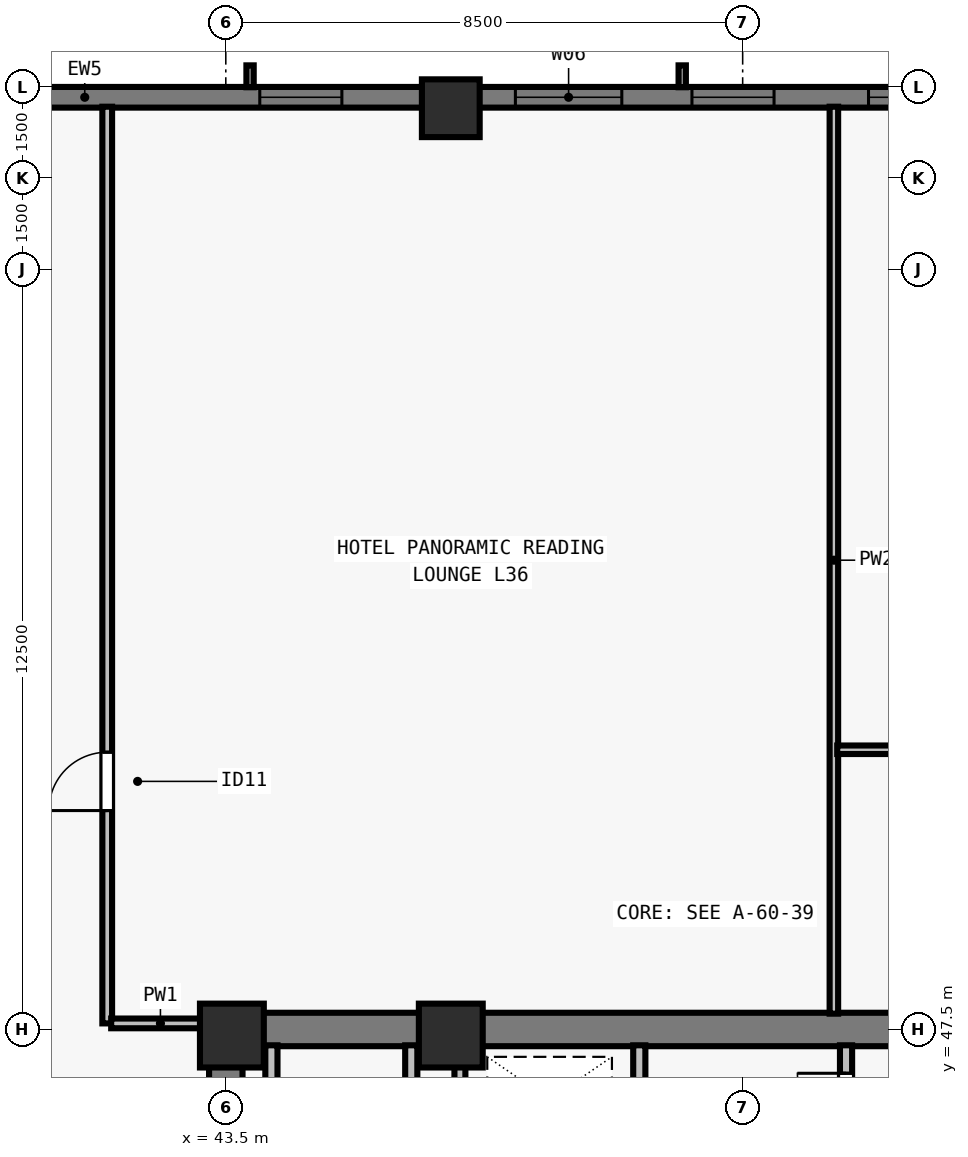
"""IFC4 building model, lengths in metres.
Left out: names, types, materials, properties, quantities, classifications, styles, units other than length and angle.
Written with IfcOpenShell. Run it as: python <this file> out.ifc"""

import sys

from ifc_helpers import new_model, si_unit, direction, frame, frame_2d, origin, origin_2d, place, context, subcontext, project, spatial, rectangle, extrude, element, fill, save


model = new_model("IFC4")
c1 = context("Model", 3, precision=1e-05, world=origin(), true_north=direction((0.0, 1.0)))
c2 = subcontext(c1, "Body", "Model", "MODEL_VIEW")
j1 = project(units=[si_unit("LENGTHUNIT", "METRE"), si_unit("PLANEANGLEUNIT", "RADIAN")], contexts=[c1])
p1 = place(None, origin())
s1 = spatial("IfcSite", under=j1, at=p1, CompositionType="ELEMENT")
p2 = place(p1, origin())
s2 = spatial("IfcBuilding", under=s1, at=p2, CompositionType="ELEMENT")
p3 = place(p2, frame((0.0, 0.0, 134.0)))
s3 = spatial("IfcBuildingStorey", under=s2, at=p3, CompositionType="ELEMENT", Elevation=134.0)
for number, where, z_axis, x_axis in (
    (1, (43.6, 47.4, 0.0), (0.0, 0.0, 1.0), (1.0, 0.0, 0.0)),
    (2, (47.2, 47.4, 0.0), (0.0, 0.0, 1.0), (1.0, 0.0, 0.0)),
):
    element("IfcColumn", number, at=place(p3, frame(where, z_axis=z_axis, x_axis=x_axis)), inside=s3, PredefinedType="COLUMN", context=c2, shape_type="SweptSolid", body=[
        extrude(rectangle(XDim=1.05, YDim=1.05, at=origin_2d()), origin(), (0.0, 0.0, 1.0), 3.5),
    ])
p4 = place(p3, frame((47.2, 62.65, 0.0), z_axis=(0.0, 0.0, 1.0), x_axis=(1.0, 0.0, 0.0)))
e3 = element("IfcColumn", 3, at=p4, inside=s3, PredefinedType="COLUMN", context=c2, shape_type="SweptSolid", body=[
    extrude(rectangle(XDim=0.95, YDim=0.95, at=origin_2d()), origin(), (0.0, 0.0, 1.0), 3.5),
])
p5 = place(p3, frame((32.0, 62.83, 0.0), z_axis=(0.0, 0.0, 1.0), x_axis=(1.0, 0.0, 0.0)))
e4 = element("IfcWall", 4, at=p5, inside=s3, PredefinedType="SOLIDWALL", context=c2, shape_type="SweptSolid", body=[
    extrude(rectangle(XDim=39.682, YDim=0.34, at=frame_2d((19.841, 0.0))), origin(), (0.0, 0.0, 1.0), 3.28),
])
p6 = place(p5, frame((4.952, 0.0, 0.8)))
e5 = element("IfcOpeningElement", 5, at=p6, cuts=e4, PredefinedType="OPENING", context=c2, shape_type="SweptSolid", body=[
    extrude(rectangle(XDim=1.35, YDim=1.66, at=frame_2d((0.675, 0.83))), frame((0.0, 0.18, 0.0), z_axis=(0.0, -1.0, 0.0), x_axis=(1.0, 0.0, 0.0)), (0.0, 0.0, 1.0), 0.36),
])
p7 = place(p5, frame((12.059, 0.0, 0.8)))
e6 = element("IfcOpeningElement", 6, at=p7, cuts=e4, PredefinedType="OPENING", context=c2, shape_type="SweptSolid", body=[
    extrude(rectangle(XDim=1.35, YDim=1.66, at=frame_2d((0.675, 0.83))), frame((0.0, 0.18, 0.0), z_axis=(0.0, -1.0, 0.0), x_axis=(1.0, 0.0, 0.0)), (0.0, 0.0, 1.0), 0.36),
])
p8 = place(p5, frame((16.262, 0.0, 0.8)))
e7 = element("IfcOpeningElement", 7, at=p8, cuts=e4, PredefinedType="OPENING", context=c2, shape_type="SweptSolid", body=[
    extrude(rectangle(XDim=1.75, YDim=1.66, at=frame_2d((0.875, 0.83))), frame((0.0, 0.18, 0.0), z_axis=(0.0, -1.0, 0.0), x_axis=(1.0, 0.0, 0.0)), (0.0, 0.0, 1.0), 0.36),
])
p9 = place(p5, frame((19.166, 0.0, 0.8)))
e8 = element("IfcOpeningElement", 8, at=p9, cuts=e4, PredefinedType="OPENING", context=c2, shape_type="SweptSolid", body=[
    extrude(rectangle(XDim=1.35, YDim=1.66, at=frame_2d((0.675, 0.83))), frame((0.0, 0.18, 0.0), z_axis=(0.0, -1.0, 0.0), x_axis=(1.0, 0.0, 0.0)), (0.0, 0.0, 1.0), 0.36),
])
p10 = place(p5, frame((22.07, 0.0, 0.8)))
e9 = element("IfcOpeningElement", 9, at=p10, cuts=e4, PredefinedType="OPENING", context=c2, shape_type="SweptSolid", body=[
    extrude(rectangle(XDim=1.75, YDim=1.66, at=frame_2d((0.875, 0.83))), frame((0.0, 0.18, 0.0), z_axis=(0.0, -1.0, 0.0), x_axis=(1.0, 0.0, 0.0)), (0.0, 0.0, 1.0), 0.36),
])
p11 = place(p5, frame((26.273, 0.0, 0.8)))
e10 = element("IfcOpeningElement", 10, at=p11, cuts=e4, PredefinedType="OPENING", context=c2, shape_type="SweptSolid", body=[
    extrude(rectangle(XDim=1.35, YDim=1.66, at=frame_2d((0.675, 0.83))), frame((0.0, 0.18, 0.0), z_axis=(0.0, -1.0, 0.0), x_axis=(1.0, 0.0, 0.0)), (0.0, 0.0, 1.0), 0.36),
])
p12 = place(p5, frame((29.627, 0.0, 0.8)))
e11 = element("IfcOpeningElement", 11, at=p12, cuts=e4, PredefinedType="OPENING", context=c2, shape_type="SweptSolid", body=[
    extrude(rectangle(XDim=1.75, YDim=1.66, at=frame_2d((0.875, 0.83))), frame((0.0, 0.18, 0.0), z_axis=(0.0, -1.0, 0.0), x_axis=(1.0, 0.0, 0.0)), (0.0, 0.0, 1.0), 0.36),
])
p13 = place(p5, frame((34.23, 0.0, 0.8)))
e12 = element("IfcOpeningElement", 12, at=p13, cuts=e4, PredefinedType="OPENING", context=c2, shape_type="SweptSolid", body=[
    extrude(rectangle(XDim=1.35, YDim=1.66, at=frame_2d((0.675, 0.83))), frame((0.0, 0.18, 0.0), z_axis=(0.0, -1.0, 0.0), x_axis=(1.0, 0.0, 0.0)), (0.0, 0.0, 1.0), 0.36),
])
p14 = place(p3, frame((43.225, 47.5, 0.0), z_axis=(0.0, 0.0, 1.0), x_axis=(1.0, 0.0, 0.0)))
e13 = element("IfcWall", 13, at=p14, inside=s3, PredefinedType="SHEAR", context=c2, shape_type="SweptSolid", body=[
    extrude(rectangle(XDim=17.55, YDim=0.55, at=frame_2d((8.775, 0.0))), origin(), (0.0, 0.0, 1.0), 3.28),
])
p15 = place(p3, frame((43.5, 40.8, 0.0), z_axis=(0.0, 0.0, 1.0), x_axis=(0.0, 1.0, 0.0)))
e14 = element("IfcWall", 14, at=p15, inside=s3, PredefinedType="SHEAR", context=c2, shape_type="SweptSolid", body=[
    extrude(rectangle(XDim=6.435, YDim=0.55, at=frame_2d((3.218, 0.0))), origin(), (0.0, 0.0, 1.0), 3.28),
])
p16 = place(p3, frame((50.3, 40.585, 0.0), z_axis=(0.0, 0.0, 1.0), x_axis=(0.0, 1.0, 0.0)))
e15 = element("IfcWall", 15, at=p16, inside=s3, PredefinedType="SOLIDWALL", context=c2, shape_type="SweptSolid", body=[
    extrude(rectangle(XDim=6.655, YDim=0.2, at=frame_2d((3.328, 0.0))), origin(), (0.0, 0.0, 1.0), 3.28),
])
p17 = place(p16, frame((5.065, 0.0, 0.0)))
e16 = element("IfcOpeningElement", 16, at=p17, cuts=e15, PredefinedType="OPENING", context=c2, shape_type="SweptSolid", body=[
    extrude(rectangle(XDim=0.8, YDim=2.08, at=frame_2d((0.4, 1.04))), frame((0.0, 0.11, 0.0), z_axis=(0.0, -1.0, 0.0), x_axis=(1.0, 0.0, 0.0)), (0.0, 0.0, 1.0), 0.22),
])
p18 = place(p3, frame((53.7, 40.585, 0.0), z_axis=(0.0, 0.0, 1.0), x_axis=(0.0, 1.0, 0.0)))
e17 = element("IfcWall", 17, at=p18, inside=s3, PredefinedType="SOLIDWALL", context=c2, shape_type="SweptSolid", body=[
    extrude(rectangle(XDim=6.655, YDim=0.2, at=frame_2d((3.328, 0.0))), origin(), (0.0, 0.0, 1.0), 3.28),
])
p19 = place(p18, frame((0.195, 0.0, 0.0)))
e18 = element("IfcOpeningElement", 18, at=p19, cuts=e17, PredefinedType="OPENING", context=c2, shape_type="SweptSolid", body=[
    extrude(rectangle(XDim=0.8, YDim=2.08, at=frame_2d((0.4, 1.04))), frame((0.0, 0.11, 0.0), z_axis=(0.0, -1.0, 0.0), x_axis=(1.0, 0.0, 0.0)), (0.0, 0.0, 1.0), 0.22),
])
p20 = place(p18, frame((3.735, 0.0, 0.0)))
e19 = element("IfcOpeningElement", 19, at=p20, cuts=e17, PredefinedType="OPENING", context=c2, shape_type="SweptSolid", body=[
    extrude(rectangle(XDim=0.9, YDim=2.12, at=frame_2d((0.45, 1.06))), frame((0.0, 0.11, 0.0), z_axis=(0.0, -1.0, 0.0), x_axis=(1.0, 0.0, 0.0)), (0.0, 0.0, 1.0), 0.22),
])
p21 = place(p18, frame((5.395, 0.0, 0.0)))
e20 = element("IfcOpeningElement", 20, at=p21, cuts=e17, PredefinedType="OPENING", context=c2, shape_type="SweptSolid", body=[
    extrude(rectangle(XDim=0.8, YDim=2.1, at=frame_2d((0.4, 1.05))), frame((0.0, 0.11, 0.0), z_axis=(0.0, -1.0, 0.0), x_axis=(1.0, 0.0, 0.0)), (0.0, 0.0, 1.0), 0.22),
])
for number, where, z_axis, x_axis in (
    (21, (46.55, 43.735, 0.0), (0.0, 0.0, 1.0), (0.0, 1.0, 0.0)),
    (22, (44.25, 43.735, 0.0), (0.0, 0.0, 1.0), (0.0, 1.0, 0.0)),
):
    element("IfcWall", number, at=place(p3, frame(where, z_axis=z_axis, x_axis=x_axis)), inside=s3, PredefinedType="SOLIDWALL", context=c2, shape_type="SweptSolid", body=[
        extrude(rectangle(XDim=3.505, YDim=0.2, at=frame_2d((1.752, 0.0))), origin(), (0.0, 0.0, 1.0), 3.28),
    ])
p22 = place(p3, frame((47.35, 43.735, 0.0), z_axis=(0.0, 0.0, 1.0), x_axis=(0.0, 1.0, 0.0)))
e23 = element("IfcWall", 23, at=p22, inside=s3, PredefinedType="SOLIDWALL", context=c2, shape_type="SweptSolid", body=[
    extrude(rectangle(XDim=3.505, YDim=0.18, at=frame_2d((1.752, 0.0))), origin(), (0.0, 0.0, 1.0), 3.28),
])
p23 = place(p3, frame((41.55, 47.6, 0.0), z_axis=(0.0, 0.0, 1.0), x_axis=(0.0, 1.0, 0.0)))
e24 = element("IfcWall", 24, at=p23, inside=s3, PredefinedType="PARTITIONING", context=c2, shape_type="SweptSolid", body=[
    extrude(rectangle(XDim=15.075, YDim=0.16, at=frame_2d((7.538, 0.0))), origin(), (0.0, 0.0, 1.0), 2.555),
])
p24 = place(p23, frame((3.5, 0.0, 0.0)))
e25 = element("IfcOpeningElement", 25, at=p24, cuts=e24, PredefinedType="OPENING", context=c2, shape_type="SweptSolid", body=[
    extrude(rectangle(XDim=0.96, YDim=2.12, at=frame_2d((0.48, 1.06))), frame((0.0, 0.09, 0.0), z_axis=(0.0, -1.0, 0.0), x_axis=(1.0, 0.0, 0.0)), (0.0, 0.0, 1.0), 0.18),
])
p25 = place(p3, frame((41.615, 47.6, 0.0), z_axis=(0.0, 0.0, 1.0), x_axis=(1.0, 0.0, 0.0)))
e26 = element("IfcWall", 26, at=p25, inside=s3, PredefinedType="PARTITIONING", context=c2, shape_type="SweptSolid", body=[
    extrude(rectangle(XDim=1.62, YDim=0.16, at=frame_2d((0.81, 0.0))), origin(), (0.0, 0.0, 1.0), 3.28),
])
p26 = place(p3, frame((53.5, 47.76, 0.0), z_axis=(0.0, 0.0, 1.0), x_axis=(0.0, 1.0, 0.0)))
e27 = element("IfcWall", 27, at=p26, inside=s3, PredefinedType="PARTITIONING", context=c2, shape_type="SweptSolid", body=[
    extrude(rectangle(XDim=14.915, YDim=0.14, at=frame_2d((7.458, 0.0))), origin(), (0.0, 0.0, 1.0), 2.896),
])
p27 = place(p3, frame((53.555, 52.1, 0.0), z_axis=(0.0, 0.0, 1.0), x_axis=(1.0, 0.0, 0.0)))
e28 = element("IfcWall", 28, at=p27, inside=s3, PredefinedType="PARTITIONING", context=c2, shape_type="SweptSolid", body=[
    extrude(rectangle(XDim=10.13, YDim=0.14, at=frame_2d((5.065, 0.0))), origin(), (0.0, 0.0, 1.0), 3.28),
])
p28 = place(p7, origin())
e29 = element("IfcWindow", 29, at=p28, inside=s3, PartitioningType="SINGLE_PANEL", PredefinedType="WINDOW", context=c2, shape_type="SweptSolid", body=[
    extrude(rectangle(XDim=1.35, YDim=1.66, at=frame_2d((0.675, 0.83))), frame((0.0, -0.05, 0.0), z_axis=(0.0, -1.0, 0.0), x_axis=(1.0, 0.0, 0.0)), (0.0, 0.0, 1.0), 0.06),
])
fill(e6, e29)
p29 = place(p8, origin())
e30 = element("IfcWindow", 30, at=p29, inside=s3, PartitioningType="SINGLE_PANEL", PredefinedType="WINDOW", context=c2, shape_type="SweptSolid", body=[
    extrude(rectangle(XDim=1.75, YDim=1.66, at=frame_2d((0.875, 0.83))), frame((0.0, -0.05, 0.0), z_axis=(0.0, -1.0, 0.0), x_axis=(1.0, 0.0, 0.0)), (0.0, 0.0, 1.0), 0.06),
])
fill(e7, e30)
p30 = place(p9, origin())
e31 = element("IfcWindow", 31, at=p30, inside=s3, PartitioningType="SINGLE_PANEL", PredefinedType="WINDOW", context=c2, shape_type="SweptSolid", body=[
    extrude(rectangle(XDim=1.35, YDim=1.66, at=frame_2d((0.675, 0.83))), frame((0.0, -0.05, 0.0), z_axis=(0.0, -1.0, 0.0), x_axis=(1.0, 0.0, 0.0)), (0.0, 0.0, 1.0), 0.06),
])
fill(e8, e31)
p31 = place(p10, origin())
e32 = element("IfcWindow", 32, at=p31, inside=s3, PartitioningType="SINGLE_PANEL", PredefinedType="WINDOW", context=c2, shape_type="SweptSolid", body=[
    extrude(rectangle(XDim=1.75, YDim=1.66, at=frame_2d((0.875, 0.83))), frame((0.0, -0.05, 0.0), z_axis=(0.0, -1.0, 0.0), x_axis=(1.0, 0.0, 0.0)), (0.0, 0.0, 1.0), 0.06),
])
fill(e9, e32)
p32 = place(p21, origin())
e33 = element("IfcDoor", 33, at=p32, inside=s3, OperationType="SINGLE_SWING_RIGHT", PredefinedType="DOOR", context=c2, shape_type="SweptSolid", body=[
    extrude(rectangle(XDim=0.8, YDim=2.1, at=frame_2d((0.4, 1.05))), frame((0.0, 0.025, 0.0), z_axis=(0.0, -1.0, 0.0), x_axis=(1.0, 0.0, 0.0)), (0.0, 0.0, 1.0), 0.05),
])
fill(e20, e33)
p33 = place(p24, origin())
e34 = element("IfcDoor", 34, at=p33, inside=s3, OperationType="SINGLE_SWING_LEFT", PredefinedType="DOOR", context=c2, shape_type="SweptSolid", body=[
    extrude(rectangle(XDim=0.96, YDim=2.12, at=frame_2d((0.48, 1.06))), frame((0.0, 0.025, 0.0), z_axis=(0.0, -1.0, 0.0), x_axis=(1.0, 0.0, 0.0)), (0.0, 0.0, 1.0), 0.05),
])
fill(e25, e34)
save(model, sys.argv[1])
